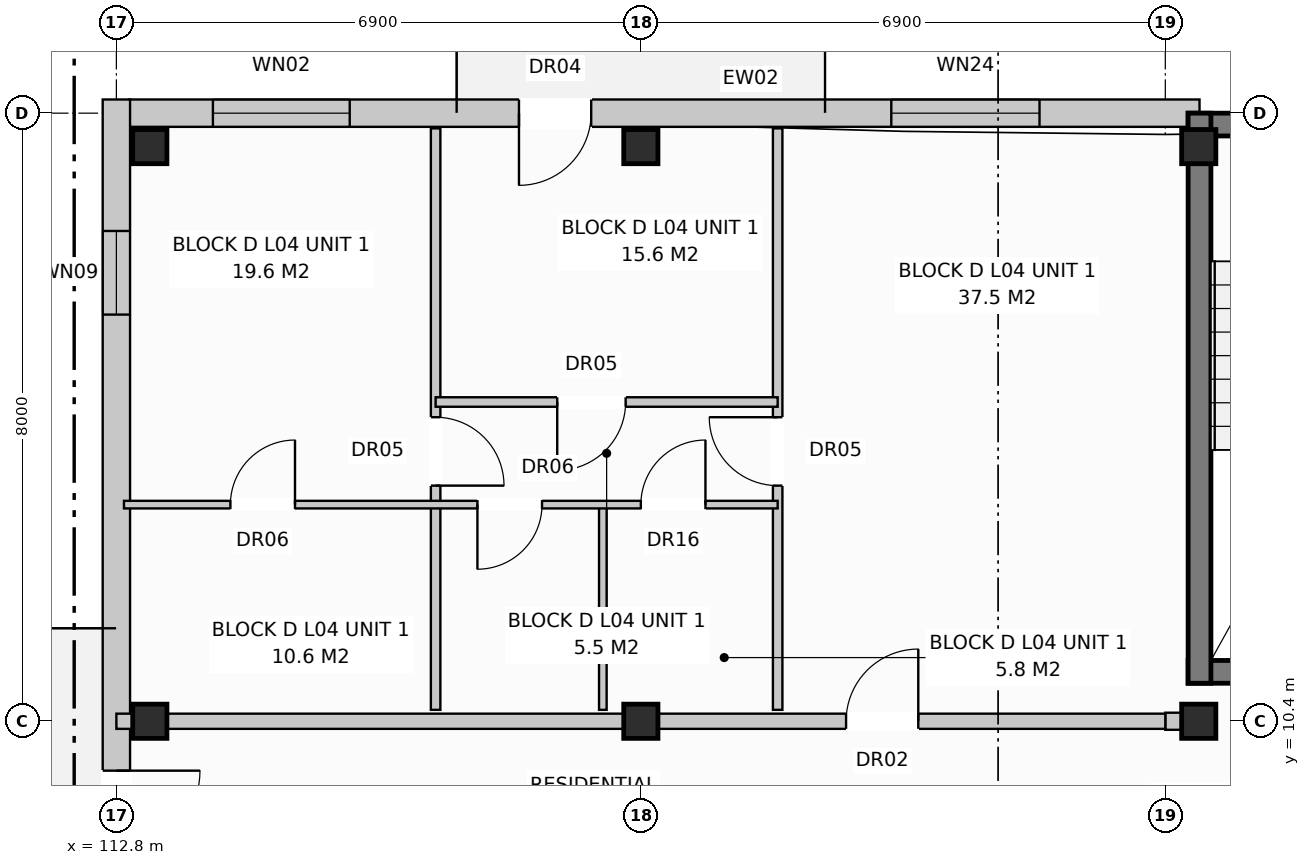
"""IFC4 building model, lengths in metres.
Left out: names, types, materials, properties, quantities, classifications, styles, units other than length and angle.
Written with IfcOpenShell. Run it as: python <this file> out.ifc"""

import sys

from ifc_helpers import new_model, si_unit, direction, frame, frame_2d, origin, origin_with_axes, origin_2d, place, context, subcontext, project, spatial, rectangle, extrude, element, fill, save


model = new_model("IFC4")
c1 = context("Model", 3, precision=1e-05, world=origin(), true_north=direction((0.0, 1.0)))
c2 = subcontext(c1, "Body", "Model", "MODEL_VIEW")
j1 = project(units=[si_unit("LENGTHUNIT", "METRE"), si_unit("PLANEANGLEUNIT", "RADIAN")], contexts=[c1])
p1 = place(None, origin())
s1 = spatial("IfcSite", under=j1, at=p1, CompositionType="ELEMENT")
p2 = place(p1, origin())
s2 = spatial("IfcBuilding", under=s1, at=p2, CompositionType="ELEMENT")
p3 = place(p2, frame((0.0, 0.0, 14.4)))
s3 = spatial("IfcBuildingStorey", under=s2, at=p3, CompositionType="ELEMENT", Elevation=14.4)
for number, where, z_axis, x_axis in (
    (1, (113.24, 10.4, 0.0), (0.0, 0.0, 1.0), (1.0, 0.0, 0.0)),
    (2, (113.24, 17.96, 0.0), (0.0, 0.0, 1.0), (1.0, 0.0, 0.0)),
    (3, (119.7, 10.4, 0.0), (0.0, 0.0, 1.0), (1.0, 0.0, 0.0)),
    (4, (119.7, 17.96, 0.0), (0.0, 0.0, 1.0), (1.0, 0.0, 0.0)),
    (5, (127.04, 10.4, 0.0), (0.0, 0.0, 1.0), (1.0, 0.0, 0.0)),
    (6, (127.04, 17.96, 0.0), (0.0, 0.0, 1.0), (1.0, 0.0, 0.0)),
):
    element("IfcColumn", number, at=place(p3, frame(where, z_axis=z_axis, x_axis=x_axis)), inside=s3, PredefinedType="COLUMN", context=c2, shape_type="SweptSolid", body=[
        extrude(rectangle(XDim=0.45, YDim=0.45, at=origin_2d()), origin(), (0.0, 0.0, 1.0), 3.2),
    ])
p4 = place(p3, frame((112.97, 18.4, 0.0), z_axis=(0.0, 0.0, 1.0), x_axis=(1.0, 0.0, 0.0)))
e7 = element("IfcWall", 7, at=p4, inside=s3, PredefinedType="STANDARD", context=c2, shape_type="SweptSolid", body=[
    extrude(rectangle(XDim=14.08, YDim=0.36, at=frame_2d((7.04, 0.0))), origin(), (0.0, 0.0, 1.0), 2.94),
])
p5 = place(p4, frame((5.127, 0.0, 0.0)))
e8 = element("IfcOpeningElement", 8, at=p5, cuts=e7, PredefinedType="OPENING", context=c2, shape_type="SweptSolid", body=[
    extrude(rectangle(XDim=0.95, YDim=2.1, at=frame_2d((0.475, 1.05))), frame((0.0, 0.192, 0.0), z_axis=(0.0, -1.0, 0.0), x_axis=(1.0, 0.0, 0.0)), (0.0, 0.0, 1.0), 0.384),
])
p6 = place(p4, frame((1.1, 0.0, 0.8)))
e9 = element("IfcOpeningElement", 9, at=p6, cuts=e7, PredefinedType="OPENING", context=c2, shape_type="SweptSolid", body=[
    extrude(rectangle(XDim=1.8, YDim=1.7, at=frame_2d((0.9, 0.85))), frame((0.0, 0.192, 0.0), z_axis=(0.0, -1.0, 0.0), x_axis=(1.0, 0.0, 0.0)), (0.0, 0.0, 1.0), 0.384),
])
p7 = place(p4, frame((10.025, 0.0, 0.8)))
e10 = element("IfcOpeningElement", 10, at=p7, cuts=e7, PredefinedType="OPENING", context=c2, shape_type="SweptSolid", body=[
    extrude(rectangle(XDim=1.95, YDim=1.65, at=frame_2d((0.975, 0.825))), frame((0.0, 0.192, 0.0), z_axis=(0.0, -1.0, 0.0), x_axis=(1.0, 0.0, 0.0)), (0.0, 0.0, 1.0), 0.384),
])
p8 = place(p3, frame((112.8, -0.18, 0.0), z_axis=(0.0, 0.0, 1.0), x_axis=(0.0, 1.0, 0.0)))
e11 = element("IfcWall", 11, at=p8, inside=s3, PredefinedType="STANDARD", context=c2, shape_type="SweptSolid", body=[
    extrude(rectangle(XDim=18.76, YDim=0.36, at=frame_2d((9.38, 0.0))), origin(), (0.0, 0.0, 1.0), 2.94),
])
p9 = place(p8, frame((8.83, 0.0, 0.0)))
e12 = element("IfcOpeningElement", 12, at=p9, cuts=e11, PredefinedType="OPENING", context=c2, shape_type="SweptSolid", body=[
    extrude(rectangle(XDim=1.1, YDim=2.1, at=frame_2d((0.55, 1.05))), frame((0.0, 0.192, 0.0), z_axis=(0.0, -1.0, 0.0), x_axis=(1.0, 0.0, 0.0)), (0.0, 0.0, 1.0), 0.384),
])
p10 = place(p8, frame((1.73, 0.0, 0.72)))
e13 = element("IfcOpeningElement", 13, at=p10, cuts=e11, PredefinedType="OPENING", context=c2, shape_type="SweptSolid", body=[
    extrude(rectangle(XDim=1.1, YDim=1.5, at=frame_2d((0.55, 0.75))), frame((0.0, 0.192, 0.0), z_axis=(0.0, -1.0, 0.0), x_axis=(1.0, 0.0, 0.0)), (0.0, 0.0, 1.0), 0.384),
])
p11 = place(p8, frame((15.93, 0.0, 0.72)))
e14 = element("IfcOpeningElement", 14, at=p11, cuts=e11, PredefinedType="OPENING", context=c2, shape_type="SweptSolid", body=[
    extrude(rectangle(XDim=1.1, YDim=1.5, at=frame_2d((0.55, 0.75))), frame((0.0, 0.192, 0.0), z_axis=(0.0, -1.0, 0.0), x_axis=(1.0, 0.0, 0.0)), (0.0, 0.0, 1.0), 0.384),
])
for number, where, z_axis, x_axis in (
    (15, (126.9, 18.25, 0.0), (0.0, 0.0, 1.0), (1.0, 0.0, 0.0)),
    (16, (126.9, 11.05, 0.0), (0.0, 0.0, 1.0), (1.0, 0.0, 0.0)),
):
    element("IfcWall", number, at=place(p3, frame(where, z_axis=z_axis, x_axis=x_axis)), inside=s3, PredefinedType="SHEAR", context=c2, shape_type="SweptSolid", body=[
        extrude(rectangle(XDim=3.5, YDim=0.3, at=frame_2d((1.75, 0.0))), origin(), (0.0, 0.0, 1.0), 2.94),
    ])
p12 = place(p3, frame((127.05, 10.9, 0.0), z_axis=(0.0, 0.0, 1.0), x_axis=(0.0, 1.0, 0.0)))
e17 = element("IfcWall", 17, at=p12, inside=s3, PredefinedType="SHEAR", context=c2, shape_type="SweptSolid", body=[
    extrude(rectangle(XDim=7.5, YDim=0.3, at=frame_2d((3.75, 0.0))), origin(), (0.0, 0.0, 1.0), 2.94),
])
p13 = place(p3, frame((126.6, 10.4, 0.0), z_axis=(0.0, 0.0, 1.0), x_axis=(1.0, 0.0, 0.0)))
e18 = element("IfcWall", 18, at=p13, inside=s3, PredefinedType="PARTITIONING", context=c2, shape_type="SweptSolid", body=[
    extrude(rectangle(XDim=0.3, YDim=0.225, at=frame_2d((0.15, 0.0))), origin(), (0.0, 0.0, 1.0), 2.94),
])
p14 = place(p3, frame((112.8, 10.4, 0.0), z_axis=(0.0, 0.0, 1.0), x_axis=(1.0, 0.0, 0.0)))
e19 = element("IfcWall", 19, at=p14, inside=s3, PredefinedType="PARTITIONING", context=c2, shape_type="SweptSolid", body=[
    extrude(rectangle(XDim=13.8, YDim=0.2, at=frame_2d((6.9, 0.0))), origin(), (0.0, 0.0, 1.0), 2.38),
])
p15 = place(p14, frame((9.6, 0.0, 0.0)))
e20 = element("IfcOpeningElement", 20, at=p15, cuts=e19, PredefinedType="OPENING", context=c2, shape_type="SweptSolid", body=[
    extrude(rectangle(XDim=0.95, YDim=2.15, at=frame_2d((0.475, 1.075))), frame((0.0, 0.112, 0.0), z_axis=(0.0, -1.0, 0.0), x_axis=(1.0, 0.0, 0.0)), (0.0, 0.0, 1.0), 0.224),
])
p16 = place(p3, frame((121.5, 10.55, 0.0), z_axis=(0.0, 0.0, 1.0), x_axis=(0.0, 1.0, 0.0)))
e21 = element("IfcWall", 21, at=p16, inside=s3, PredefinedType="PARTITIONING", context=c2, shape_type="SweptSolid", body=[
    extrude(rectangle(XDim=7.65, YDim=0.125, at=frame_2d((3.825, 0.0))), origin(), (0.0, 0.0, 1.0), 2.94),
])
p17 = place(p16, frame((2.95, 0.0, 0.0)))
e22 = element("IfcOpeningElement", 22, at=p17, cuts=e21, PredefinedType="OPENING", context=c2, shape_type="SweptSolid", body=[
    extrude(rectangle(XDim=0.9, YDim=2.1, at=frame_2d((0.45, 1.05))), frame((0.0, 0.074, 0.0), z_axis=(0.0, -1.0, 0.0), x_axis=(1.0, 0.0, 0.0)), (0.0, 0.0, 1.0), 0.149),
])
p18 = place(p3, frame((117.0, 10.55, 0.0), z_axis=(0.0, 0.0, 1.0), x_axis=(0.0, 1.0, 0.0)))
e23 = element("IfcWall", 23, at=p18, inside=s3, PredefinedType="PARTITIONING", context=c2, shape_type="SweptSolid", body=[
    extrude(rectangle(XDim=7.65, YDim=0.125, at=frame_2d((3.825, 0.0))), origin(), (0.0, 0.0, 1.0), 2.94),
])
p19 = place(p18, frame((2.95, 0.0, 0.0)))
e24 = element("IfcOpeningElement", 24, at=p19, cuts=e23, PredefinedType="OPENING", context=c2, shape_type="SweptSolid", body=[
    extrude(rectangle(XDim=0.9, YDim=2.1, at=frame_2d((0.45, 1.05))), frame((0.0, 0.074, 0.0), z_axis=(0.0, -1.0, 0.0), x_axis=(1.0, 0.0, 0.0)), (0.0, 0.0, 1.0), 0.149),
])
p20 = place(p3, frame((119.2, 10.55, 0.0), z_axis=(0.0, 0.0, 1.0), x_axis=(0.0, 1.0, 0.0)))
e25 = element("IfcWall", 25, at=p20, inside=s3, PredefinedType="PARTITIONING", context=c2, shape_type="SweptSolid", body=[
    extrude(rectangle(XDim=2.7, YDim=0.1, at=frame_2d((1.35, 0.0))), origin(), (0.0, 0.0, 1.0), 2.94),
])
p21 = place(p3, frame((112.9, 13.25, 0.0), z_axis=(0.0, 0.0, 1.0), x_axis=(1.0, 0.0, 0.0)))
e26 = element("IfcWall", 26, at=p21, inside=s3, PredefinedType="PARTITIONING", context=c2, shape_type="SweptSolid", body=[
    extrude(rectangle(XDim=8.6, YDim=0.1, at=frame_2d((4.3, 0.0))), origin(), (0.0, 0.0, 1.0), 2.94),
])
p22 = place(p21, frame((1.4, 0.0, 0.0)))
e27 = element("IfcOpeningElement", 27, at=p22, cuts=e26, PredefinedType="OPENING", context=c2, shape_type="SweptSolid", body=[
    extrude(rectangle(XDim=0.85, YDim=2.05, at=frame_2d((0.425, 1.025))), frame((0.0, 0.062, 0.0), z_axis=(0.0, -1.0, 0.0), x_axis=(1.0, 0.0, 0.0)), (0.0, 0.0, 1.0), 0.124),
])
p23 = place(p21, frame((4.65, 0.0, 0.0)))
e28 = element("IfcOpeningElement", 28, at=p23, cuts=e26, PredefinedType="OPENING", context=c2, shape_type="SweptSolid", body=[
    extrude(rectangle(XDim=0.85, YDim=2.05, at=frame_2d((0.425, 1.025))), frame((0.0, 0.062, 0.0), z_axis=(0.0, -1.0, 0.0), x_axis=(1.0, 0.0, 0.0)), (0.0, 0.0, 1.0), 0.124),
])
p24 = place(p21, frame((6.8, 0.0, 0.0)))
e29 = element("IfcOpeningElement", 29, at=p24, cuts=e26, PredefinedType="OPENING", context=c2, shape_type="SweptSolid", body=[
    extrude(rectangle(XDim=0.85, YDim=2.1, at=frame_2d((0.425, 1.05))), frame((0.0, 0.062, 0.0), z_axis=(0.0, -1.0, 0.0), x_axis=(1.0, 0.0, 0.0)), (0.0, 0.0, 1.0), 0.124),
])
p25 = place(p3, frame((117.0, 14.6, 0.0), z_axis=(0.0, 0.0, 1.0), x_axis=(1.0, 0.0, 0.0)))
e30 = element("IfcWall", 30, at=p25, inside=s3, PredefinedType="PARTITIONING", context=c2, shape_type="SweptSolid", body=[
    extrude(rectangle(XDim=4.5, YDim=0.125, at=frame_2d((2.25, 0.0))), origin(), (0.0, 0.0, 1.0), 2.94),
])
p26 = place(p25, frame((1.6, 0.0, 0.0)))
e31 = element("IfcOpeningElement", 31, at=p26, cuts=e30, PredefinedType="OPENING", context=c2, shape_type="SweptSolid", body=[
    extrude(rectangle(XDim=0.9, YDim=2.1, at=frame_2d((0.45, 1.05))), frame((0.0, 0.074, 0.0), z_axis=(0.0, -1.0, 0.0), x_axis=(1.0, 0.0, 0.0)), (0.0, 0.0, 1.0), 0.149),
])
p27 = place(p5, frame((0.95, 0.0, 0.0), z_axis=(0.0, 0.0, 1.0), x_axis=(-1.0, 0.0, 0.0)))
e32 = element("IfcDoor", 32, at=p27, inside=s3, OperationType="SINGLE_SWING_LEFT", PredefinedType="DOOR", context=c2, shape_type="SweptSolid", body=[
    extrude(rectangle(XDim=0.95, YDim=2.1, at=frame_2d((0.475, 1.05))), frame((0.0, 0.025, 0.0), z_axis=(0.0, -1.0, 0.0), x_axis=(1.0, 0.0, 0.0)), (0.0, 0.0, 1.0), 0.05),
])
fill(e8, e32)
p28 = place(p6, origin_with_axes())
e33 = element("IfcWindow", 33, at=p28, inside=s3, PartitioningType="SINGLE_PANEL", PredefinedType="WINDOW", context=c2, shape_type="SweptSolid", body=[
    extrude(rectangle(XDim=1.8, YDim=1.7, at=frame_2d((0.9, 0.85))), frame((0.0, 0.03, 0.0), z_axis=(0.0, -1.0, 0.0), x_axis=(1.0, 0.0, 0.0)), (0.0, 0.0, 1.0), 0.06),
])
fill(e9, e33)
p29 = place(p7, origin_with_axes())
e34 = element("IfcWindow", 34, at=p29, inside=s3, PartitioningType="SINGLE_PANEL", PredefinedType="WINDOW", context=c2, shape_type="SweptSolid", body=[
    extrude(rectangle(XDim=1.95, YDim=1.65, at=frame_2d((0.975, 0.825))), frame((0.0, 0.03, 0.0), z_axis=(0.0, -1.0, 0.0), x_axis=(1.0, 0.0, 0.0)), (0.0, 0.0, 1.0), 0.06),
])
fill(e10, e34)
p30 = place(p9, frame((1.1, 0.0, 0.0), z_axis=(0.0, 0.0, 1.0), x_axis=(-1.0, 0.0, 0.0)))
e35 = element("IfcDoor", 35, at=p30, inside=s3, OperationType="SINGLE_SWING_RIGHT", PredefinedType="DOOR", context=c2, shape_type="SweptSolid", body=[
    extrude(rectangle(XDim=1.1, YDim=2.1, at=frame_2d((0.55, 1.05))), frame((0.0, 0.025, 0.0), z_axis=(0.0, -1.0, 0.0), x_axis=(1.0, 0.0, 0.0)), (0.0, 0.0, 1.0), 0.05),
])
fill(e12, e35)
p31 = place(p11, origin_with_axes())
e36 = element("IfcWindow", 36, at=p31, inside=s3, PartitioningType="SINGLE_PANEL", PredefinedType="WINDOW", context=c2, shape_type="SweptSolid", body=[
    extrude(rectangle(XDim=1.1, YDim=1.5, at=frame_2d((0.55, 0.75))), frame((0.0, 0.03, 0.0), z_axis=(0.0, -1.0, 0.0), x_axis=(1.0, 0.0, 0.0)), (0.0, 0.0, 1.0), 0.06),
])
fill(e14, e36)
p32 = place(p15, origin_with_axes())
e37 = element("IfcDoor", 37, at=p32, inside=s3, OperationType="SINGLE_SWING_RIGHT", PredefinedType="DOOR", context=c2, shape_type="SweptSolid", body=[
    extrude(rectangle(XDim=0.95, YDim=2.15, at=frame_2d((0.475, 1.075))), frame((0.0, 0.025, 0.0), z_axis=(0.0, -1.0, 0.0), x_axis=(1.0, 0.0, 0.0)), (0.0, 0.0, 1.0), 0.05),
])
fill(e20, e37)
p33 = place(p17, origin_with_axes())
e38 = element("IfcDoor", 38, at=p33, inside=s3, OperationType="SINGLE_SWING_RIGHT", PredefinedType="DOOR", context=c2, shape_type="SweptSolid", body=[
    extrude(rectangle(XDim=0.9, YDim=2.1, at=frame_2d((0.45, 1.05))), frame((0.0, 0.025, 0.0), z_axis=(0.0, -1.0, 0.0), x_axis=(1.0, 0.0, 0.0)), (0.0, 0.0, 1.0), 0.05),
])
fill(e22, e38)
p34 = place(p19, frame((0.9, 0.0, 0.0), z_axis=(0.0, 0.0, 1.0), x_axis=(-1.0, 0.0, 0.0)))
e39 = element("IfcDoor", 39, at=p34, inside=s3, OperationType="SINGLE_SWING_LEFT", PredefinedType="DOOR", context=c2, shape_type="SweptSolid", body=[
    extrude(rectangle(XDim=0.9, YDim=2.1, at=frame_2d((0.45, 1.05))), frame((0.0, 0.025, 0.0), z_axis=(0.0, -1.0, 0.0), x_axis=(1.0, 0.0, 0.0)), (0.0, 0.0, 1.0), 0.05),
])
fill(e24, e39)
p35 = place(p22, origin_with_axes())
e40 = element("IfcDoor", 40, at=p35, inside=s3, OperationType="SINGLE_SWING_RIGHT", PredefinedType="DOOR", context=c2, shape_type="SweptSolid", body=[
    extrude(rectangle(XDim=0.85, YDim=2.05, at=frame_2d((0.425, 1.025))), frame((0.0, 0.025, 0.0), z_axis=(0.0, -1.0, 0.0), x_axis=(1.0, 0.0, 0.0)), (0.0, 0.0, 1.0), 0.05),
])
fill(e27, e40)
p36 = place(p23, frame((0.85, 0.0, 0.0), z_axis=(0.0, 0.0, 1.0), x_axis=(-1.0, 0.0, 0.0)))
e41 = element("IfcDoor", 41, at=p36, inside=s3, OperationType="SINGLE_SWING_LEFT", PredefinedType="DOOR", context=c2, shape_type="SweptSolid", body=[
    extrude(rectangle(XDim=0.85, YDim=2.05, at=frame_2d((0.425, 1.025))), frame((0.0, 0.025, 0.0), z_axis=(0.0, -1.0, 0.0), x_axis=(1.0, 0.0, 0.0)), (0.0, 0.0, 1.0), 0.05),
])
fill(e28, e41)
p37 = place(p24, origin_with_axes())
e42 = element("IfcDoor", 42, at=p37, inside=s3, OperationType="SINGLE_SWING_RIGHT", PredefinedType="DOOR", context=c2, shape_type="SweptSolid", body=[
    extrude(rectangle(XDim=0.85, YDim=2.1, at=frame_2d((0.425, 1.05))), frame((0.0, 0.025, 0.0), z_axis=(0.0, -1.0, 0.0), x_axis=(1.0, 0.0, 0.0)), (0.0, 0.0, 1.0), 0.05),
])
fill(e29, e42)
p38 = place(p26, frame((0.9, 0.0, 0.0), z_axis=(0.0, 0.0, 1.0), x_axis=(-1.0, 0.0, 0.0)))
e43 = element("IfcDoor", 43, at=p38, inside=s3, OperationType="SINGLE_SWING_LEFT", PredefinedType="DOOR", context=c2, shape_type="SweptSolid", body=[
    extrude(rectangle(XDim=0.9, YDim=2.1, at=frame_2d((0.45, 1.05))), frame((0.0, 0.025, 0.0), z_axis=(0.0, -1.0, 0.0), x_axis=(1.0, 0.0, 0.0)), (0.0, 0.0, 1.0), 0.05),
])
fill(e31, e43)
save(model, sys.argv[1])
